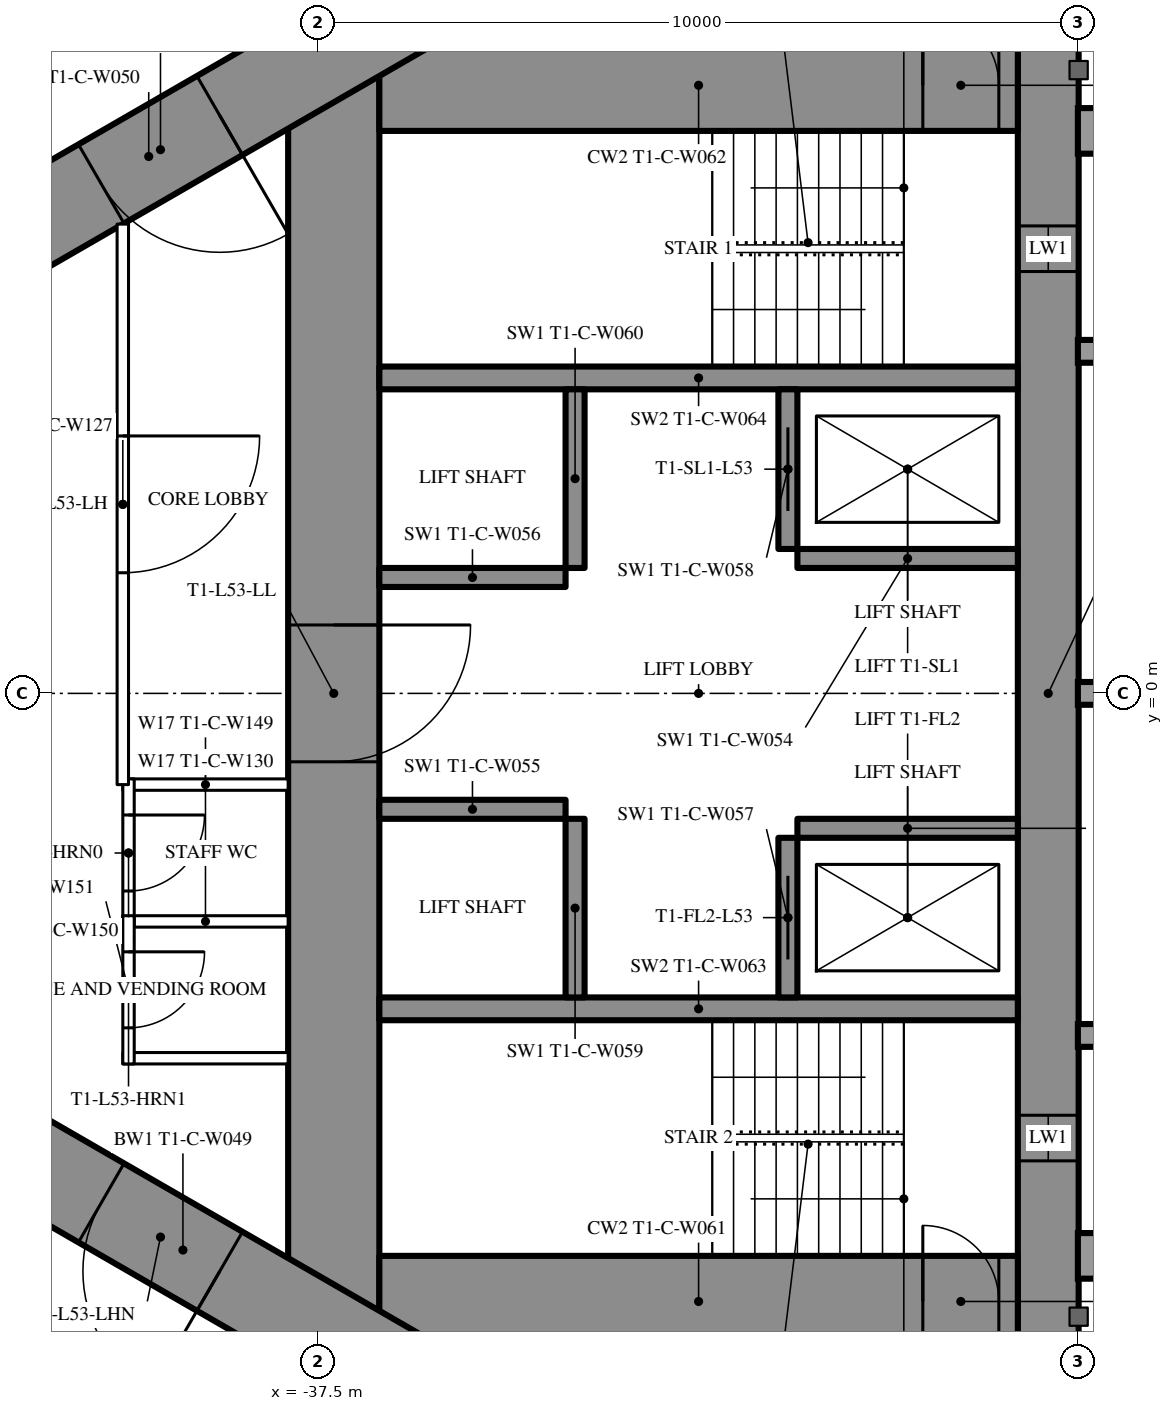
"""IFC4 building model, lengths in metres.
Left out: names, types, materials, properties, quantities, classifications, styles, units other than length and angle.
Written with IfcOpenShell. Run it as: python <this file> out.ifc"""

import sys

from ifc_helpers import new_model, si_unit, direction, frame, frame_2d, origin, place, context, subcontext, project, spatial, rectangle, extrude, element, fill, save


model = new_model("IFC4")
c1 = context("Model", 3, precision=1e-05, world=origin(), true_north=direction((0.0, 1.0)))
c2 = subcontext(c1, "Body", "Model", "MODEL_VIEW")
j1 = project(units=[si_unit("LENGTHUNIT", "METRE"), si_unit("PLANEANGLEUNIT", "RADIAN")], contexts=[c1])
p1 = place(None, origin())
s1 = spatial("IfcSite", under=j1, at=p1, CompositionType="ELEMENT")
p2 = place(p1, origin())
s2 = spatial("IfcBuilding", under=s1, at=p2, CompositionType="ELEMENT")
p3 = place(p2, frame((0.0, 0.0, 198.3)))
s3 = spatial("IfcBuildingStorey", under=s2, at=p3, CompositionType="ELEMENT", Elevation=198.3)
p4 = place(p3, frame((-27.9, 8.6, 0.0), z_axis=(0.0, 0.0, 1.0), x_axis=(0.0, -1.0, 0.0)))
e1 = element("IfcWall", 1, at=p4, inside=s3, PredefinedType="SHEAR", context=c2, shape_type="SweptSolid", body=[
    extrude(rectangle(XDim=17.2, YDim=0.8, at=frame_2d((8.6, 0.0))), origin(), (0.0, 0.0, 1.0), 3.5),
])
p5 = place(p4, frame((2.45, 0.0, 0.6)))
e2 = element("IfcOpeningElement", 2, at=p5, cuts=e1, PredefinedType="OPENING", context=c2, shape_type="SweptSolid", body=[
    extrude(rectangle(XDim=0.6, YDim=2.1, at=frame_2d((0.3, 1.05))), frame((0.0, 0.41, 0.0), z_axis=(0.0, -1.0, 0.0), x_axis=(1.0, 0.0, 0.0)), (0.0, 0.0, 1.0), 0.82),
])
p6 = place(p4, frame((14.15, 0.0, 0.6)))
e3 = element("IfcOpeningElement", 3, at=p6, cuts=e1, PredefinedType="OPENING", context=c2, shape_type="SweptSolid", body=[
    extrude(rectangle(XDim=0.6, YDim=2.1, at=frame_2d((0.3, 1.05))), frame((0.0, 0.41, 0.0), z_axis=(0.0, -1.0, 0.0), x_axis=(1.0, 0.0, 0.0)), (0.0, 0.0, 1.0), 0.82),
])
p7 = place(p3, frame((-37.3, 8.6, 0.0), z_axis=(0.0, 0.0, 1.0), x_axis=(0.0, -1.0, 0.0)))
e4 = element("IfcWall", 4, at=p7, inside=s3, PredefinedType="SHEAR", context=c2, shape_type="SweptSolid", body=[
    extrude(rectangle(XDim=17.2, YDim=1.2, at=frame_2d((8.6, 0.0))), origin(), (0.0, 0.0, 1.0), 3.5),
])
p8 = place(p7, frame((7.7, 0.0, 0.0)))
e5 = element("IfcOpeningElement", 5, at=p8, cuts=e4, PredefinedType="OPENING", context=c2, shape_type="SweptSolid", body=[
    extrude(rectangle(XDim=1.8, YDim=2.2, at=frame_2d((0.9, 1.1))), frame((0.0, 0.61, 0.0), z_axis=(0.0, -1.0, 0.0), x_axis=(1.0, 0.0, 0.0)), (0.0, 0.0, 1.0), 1.22),
])
p9 = place(p3, frame((-28.3, 8.0, 0.0), z_axis=(0.0, 0.0, 1.0), x_axis=(-1.0, 0.0, 0.0)))
e6 = element("IfcWall", 6, at=p9, inside=s3, PredefinedType="SHEAR", context=c2, shape_type="SweptSolid", body=[
    extrude(rectangle(XDim=8.4, YDim=1.2, at=frame_2d((4.2, 0.0))), origin(), (0.0, 0.0, 1.0), 3.5),
])
p10 = place(p9, frame((0.25, 0.0, 0.0)))
e7 = element("IfcOpeningElement", 7, at=p10, cuts=e6, PredefinedType="OPENING", context=c2, shape_type="SweptSolid", body=[
    extrude(rectangle(XDim=1.0, YDim=2.2, at=frame_2d((0.5, 1.1))), frame((0.0, 0.61, 0.0), z_axis=(0.0, -1.0, 0.0), x_axis=(1.0, 0.0, 0.0)), (0.0, 0.0, 1.0), 1.22),
])
p11 = place(p3, frame((-28.3, -8.0, 0.0), z_axis=(0.0, 0.0, 1.0), x_axis=(-1.0, 0.0, 0.0)))
e8 = element("IfcWall", 8, at=p11, inside=s3, PredefinedType="SHEAR", context=c2, shape_type="SweptSolid", body=[
    extrude(rectangle(XDim=8.4, YDim=1.2, at=frame_2d((4.2, 0.0))), origin(), (0.0, 0.0, 1.0), 3.5),
])
p12 = place(p11, frame((0.25, 0.0, 0.0)))
e9 = element("IfcOpeningElement", 9, at=p12, cuts=e8, PredefinedType="OPENING", context=c2, shape_type="SweptSolid", body=[
    extrude(rectangle(XDim=1.0, YDim=2.2, at=frame_2d((0.5, 1.1))), frame((0.0, 0.61, 0.0), z_axis=(0.0, -1.0, 0.0), x_axis=(1.0, 0.0, 0.0)), (0.0, 0.0, 1.0), 1.22),
])
for number, where, z_axis, x_axis in (
    (10, (-28.3, 4.15, 0.0), (0.0, 0.0, 1.0), (-1.0, 0.0, 0.0)),
    (11, (-28.3, -4.15, 0.0), (0.0, 0.0, 1.0), (-1.0, 0.0, 0.0)),
):
    element("IfcWall", number, at=place(p3, frame(where, z_axis=z_axis, x_axis=x_axis)), inside=s3, PredefinedType="SHEAR", context=c2, shape_type="SweptSolid", body=[
        extrude(rectangle(XDim=8.4, YDim=0.3, at=frame_2d((4.2, 0.0))), origin(), (0.0, 0.0, 1.0), 3.5),
    ])
p13 = place(p3, frame((-31.325, 4.0, 0.0), z_axis=(0.0, 0.0, 1.0), x_axis=(0.0, -1.0, 0.0)))
e12 = element("IfcWall", 12, at=p13, inside=s3, PredefinedType="SHEAR", context=c2, shape_type="SweptSolid", body=[
    extrude(rectangle(XDim=2.1, YDim=0.25, at=frame_2d((1.05, 0.0))), origin(), (0.0, 0.0, 1.0), 3.5),
])
p14 = place(p13, frame((0.5, 0.0, 0.0)))
e13 = element("IfcOpeningElement", 13, at=p14, cuts=e12, PredefinedType="OPENING", context=c2, shape_type="SweptSolid", body=[
    extrude(rectangle(XDim=1.1, YDim=2.2, at=frame_2d((0.55, 1.1))), frame((0.0, 0.135, 0.0), z_axis=(0.0, -1.0, 0.0), x_axis=(1.0, 0.0, 0.0)), (0.0, 0.0, 1.0), 0.27),
])
p15 = place(p3, frame((-34.125, 4.0, 0.0), z_axis=(0.0, 0.0, 1.0), x_axis=(0.0, -1.0, 0.0)))
e14 = element("IfcWall", 14, at=p15, inside=s3, PredefinedType="SHEAR", context=c2, shape_type="SweptSolid", body=[
    extrude(rectangle(XDim=2.35, YDim=0.25, at=frame_2d((1.175, 0.0))), origin(), (0.0, 0.0, 1.0), 3.5),
])
p16 = place(p3, frame((-28.3, 1.775, 0.0), z_axis=(0.0, 0.0, 1.0), x_axis=(-1.0, 0.0, 0.0)))
e15 = element("IfcWall", 15, at=p16, inside=s3, PredefinedType="SHEAR", context=c2, shape_type="SweptSolid", body=[
    extrude(rectangle(XDim=2.9, YDim=0.25, at=frame_2d((1.45, 0.0))), origin(), (0.0, 0.0, 1.0), 3.5),
])
p17 = place(p3, frame((-34.25, 1.525, 0.0), z_axis=(0.0, 0.0, 1.0), x_axis=(-1.0, 0.0, 0.0)))
e16 = element("IfcWall", 16, at=p17, inside=s3, PredefinedType="SHEAR", context=c2, shape_type="SweptSolid", body=[
    extrude(rectangle(XDim=2.45, YDim=0.25, at=frame_2d((1.225, 0.0))), origin(), (0.0, 0.0, 1.0), 3.5),
])
p18 = place(p3, frame((-31.325, -1.9, 0.0), z_axis=(0.0, 0.0, 1.0), x_axis=(0.0, -1.0, 0.0)))
e17 = element("IfcWall", 17, at=p18, inside=s3, PredefinedType="SHEAR", context=c2, shape_type="SweptSolid", body=[
    extrude(rectangle(XDim=2.1, YDim=0.25, at=frame_2d((1.05, 0.0))), origin(), (0.0, 0.0, 1.0), 3.5),
])
p19 = place(p18, frame((0.5, 0.0, 0.0)))
e18 = element("IfcOpeningElement", 18, at=p19, cuts=e17, PredefinedType="OPENING", context=c2, shape_type="SweptSolid", body=[
    extrude(rectangle(XDim=1.1, YDim=2.2, at=frame_2d((0.55, 1.1))), frame((0.0, 0.135, 0.0), z_axis=(0.0, -1.0, 0.0), x_axis=(1.0, 0.0, 0.0)), (0.0, 0.0, 1.0), 0.27),
])
p20 = place(p3, frame((-34.125, -1.65, 0.0), z_axis=(0.0, 0.0, 1.0), x_axis=(0.0, -1.0, 0.0)))
e19 = element("IfcWall", 19, at=p20, inside=s3, PredefinedType="SHEAR", context=c2, shape_type="SweptSolid", body=[
    extrude(rectangle(XDim=2.35, YDim=0.25, at=frame_2d((1.175, 0.0))), origin(), (0.0, 0.0, 1.0), 3.5),
])
p21 = place(p3, frame((-28.3, -1.775, 0.0), z_axis=(0.0, 0.0, 1.0), x_axis=(-1.0, 0.0, 0.0)))
e20 = element("IfcWall", 20, at=p21, inside=s3, PredefinedType="SHEAR", context=c2, shape_type="SweptSolid", body=[
    extrude(rectangle(XDim=2.9, YDim=0.25, at=frame_2d((1.45, 0.0))), origin(), (0.0, 0.0, 1.0), 3.5),
])
p22 = place(p3, frame((-34.25, -1.525, 0.0), z_axis=(0.0, 0.0, 1.0), x_axis=(-1.0, 0.0, 0.0)))
e21 = element("IfcWall", 21, at=p22, inside=s3, PredefinedType="SHEAR", context=c2, shape_type="SweptSolid", body=[
    extrude(rectangle(XDim=2.45, YDim=0.25, at=frame_2d((1.225, 0.0))), origin(), (0.0, 0.0, 1.0), 3.5),
])
p23 = place(p3, frame((-27.2, 14.3, 0.0), z_axis=(0.0, 0.0, 1.0), x_axis=(-0.866026593062, -0.499997940104, 0.0)))
e22 = element("IfcWall", 22, at=p23, inside=s3, PredefinedType="SHEAR", context=c2, shape_type="SweptSolid", body=[
    extrude(rectangle(XDim=28.946, YDim=1.2, at=frame_2d((14.473, 0.0))), origin(), (0.0, 0.0, 1.0), 3.5),
])
p24 = place(p23, frame((4.6, 0.0, 0.0)))
e23 = element("IfcOpeningElement", 23, at=p24, cuts=e22, PredefinedType="OPENING", context=c2, shape_type="SweptSolid", body=[
    extrude(rectangle(XDim=1.0, YDim=2.2, at=frame_2d((0.5, 1.1))), frame((0.0, 0.61, 0.0), z_axis=(0.0, -1.0, 0.0), x_axis=(1.0, 0.0, 0.0)), (0.0, 0.0, 1.0), 1.22),
])
p25 = place(p23, frame((13.395, 0.0, 0.0)))
e24 = element("IfcOpeningElement", 24, at=p25, cuts=e22, PredefinedType="OPENING", context=c2, shape_type="SweptSolid", body=[
    extrude(rectangle(XDim=1.8, YDim=2.2, at=frame_2d((0.9, 1.1))), frame((0.0, 0.61, 0.0), z_axis=(0.0, -1.0, 0.0), x_axis=(1.0, 0.0, 0.0)), (0.0, 0.0, 1.0), 1.22),
])
p26 = place(p3, frame((-27.2, -14.3, 0.0), z_axis=(0.0, 0.0, 1.0), x_axis=(-0.866024021859, 0.500002393557, 0.0)))
e25 = element("IfcWall", 25, at=p26, inside=s3, PredefinedType="SHEAR", context=c2, shape_type="SweptSolid", body=[
    extrude(rectangle(XDim=27.907, YDim=1.2, at=frame_2d((13.954, 0.0))), origin(), (0.0, 0.0, 1.0), 3.5),
])
p27 = place(p26, frame((4.6, 0.0, 0.0)))
e26 = element("IfcOpeningElement", 26, at=p27, cuts=e25, PredefinedType="OPENING", context=c2, shape_type="SweptSolid", body=[
    extrude(rectangle(XDim=1.0, YDim=2.2, at=frame_2d((0.5, 1.1))), frame((0.0, 0.61, 0.0), z_axis=(0.0, -1.0, 0.0), x_axis=(1.0, 0.0, 0.0)), (0.0, 0.0, 1.0), 1.22),
])
p28 = place(p26, frame((13.395, 0.0, 0.0)))
e27 = element("IfcOpeningElement", 27, at=p28, cuts=e25, PredefinedType="OPENING", context=c2, shape_type="SweptSolid", body=[
    extrude(rectangle(XDim=1.8, YDim=2.2, at=frame_2d((0.9, 1.1))), frame((0.0, 0.61, 0.0), z_axis=(0.0, -1.0, 0.0), x_axis=(1.0, 0.0, 0.0)), (0.0, 0.0, 1.0), 1.22),
])
p29 = place(p3, frame((-27.86, 16.575, 0.0), z_axis=(0.0, 0.0, 1.0), x_axis=(-0.866025533911, -0.499999774615, 0.0)))
e28 = element("IfcWall", 28, at=p29, inside=s3, PredefinedType="PARTITIONING", context=c2, shape_type="SweptSolid", body=[
    extrude(rectangle(XDim=33.149, YDim=0.2, at=frame_2d((16.575, 0.0))), origin(), (0.0, 0.0, 1.0), 3.25),
])
p30 = place(p29, frame((3.75, 0.0, 0.0)))
e29 = element("IfcOpeningElement", 29, at=p30, cuts=e28, PredefinedType="OPENING", context=c2, shape_type="SweptSolid", body=[
    extrude(rectangle(XDim=1.0, YDim=2.2, at=frame_2d((0.5, 1.1))), frame((0.0, 0.11, 0.0), z_axis=(0.0, -1.0, 0.0), x_axis=(1.0, 0.0, 0.0)), (0.0, 0.0, 1.0), 0.22),
])
p31 = place(p29, frame((16.402, 0.0, 0.0)))
e30 = element("IfcOpeningElement", 30, at=p31, cuts=e28, PredefinedType="OPENING", context=c2, shape_type="SweptSolid", body=[
    extrude(rectangle(XDim=0.95, YDim=2.2, at=frame_2d((0.475, 1.1))), frame((0.0, 0.11, 0.0), z_axis=(0.0, -1.0, 0.0), x_axis=(1.0, 0.0, 0.0)), (0.0, 0.0, 1.0), 0.22),
])
p32 = place(p29, frame((22.047, 0.0, 0.0)))
e31 = element("IfcOpeningElement", 31, at=p32, cuts=e28, PredefinedType="OPENING", context=c2, shape_type="SweptSolid", body=[
    extrude(rectangle(XDim=0.95, YDim=2.2, at=frame_2d((0.475, 1.1))), frame((0.0, 0.11, 0.0), z_axis=(0.0, -1.0, 0.0), x_axis=(1.0, 0.0, 0.0)), (0.0, 0.0, 1.0), 0.22),
])
p33 = place(p29, frame((30.396, 0.0, 0.0)))
e32 = element("IfcOpeningElement", 32, at=p33, cuts=e28, PredefinedType="OPENING", context=c2, shape_type="SweptSolid", body=[
    extrude(rectangle(XDim=1.8, YDim=2.2, at=frame_2d((0.9, 1.1))), frame((0.0, 0.11, 0.0), z_axis=(0.0, -1.0, 0.0), x_axis=(1.0, 0.0, 0.0)), (0.0, 0.0, 1.0), 0.22),
])
for number, where, z_axis, x_axis in (
    (33, (-37.9, -1.2, 0.0), (0.0, 0.0, 1.0), (-1.0, 0.0, 0.0)),
    (34, (-37.9, -3.0, 0.0), (0.0, 0.0, 1.0), (-1.0, 0.0, 0.0)),
    (35, (-37.9, -4.8, 0.0), (0.0, 0.0, 1.0), (-1.0, 0.0, 0.0)),
):
    element("IfcWall", number, at=place(p3, frame(where, z_axis=z_axis, x_axis=x_axis)), inside=s3, PredefinedType="PARTITIONING", context=c2, shape_type="SweptSolid", body=[
        extrude(rectangle(XDim=2.175, YDim=0.15, at=frame_2d((1.087, 0.0))), origin(), (0.0, 0.0, 1.0), 3.25),
    ])
p34 = place(p3, frame((-40.0, -1.125, 0.0), z_axis=(0.0, 0.0, 1.0), x_axis=(0.0, -1.0, 0.0)))
e36 = element("IfcWall", 36, at=p34, inside=s3, PredefinedType="PARTITIONING", context=c2, shape_type="SweptSolid", body=[
    extrude(rectangle(XDim=1.95, YDim=0.15, at=frame_2d((0.975, 0.0))), origin(), (0.0, 0.0, 1.0), 3.25),
])
p35 = place(p34, frame((0.475, 0.0, 0.0)))
e37 = element("IfcOpeningElement", 37, at=p35, cuts=e36, PredefinedType="OPENING", context=c2, shape_type="SweptSolid", body=[
    extrude(rectangle(XDim=1.0, YDim=2.2, at=frame_2d((0.5, 1.1))), frame((0.0, 0.085, 0.0), z_axis=(0.0, -1.0, 0.0), x_axis=(1.0, 0.0, 0.0)), (0.0, 0.0, 1.0), 0.17),
])
p36 = place(p3, frame((-40.0, -2.925, 0.0), z_axis=(0.0, 0.0, 1.0), x_axis=(0.0, -1.0, 0.0)))
e38 = element("IfcWall", 38, at=p36, inside=s3, PredefinedType="PARTITIONING", context=c2, shape_type="SweptSolid", body=[
    extrude(rectangle(XDim=1.95, YDim=0.15, at=frame_2d((0.975, 0.0))), origin(), (0.0, 0.0, 1.0), 3.25),
])
p37 = place(p36, frame((0.475, 0.0, 0.0)))
e39 = element("IfcOpeningElement", 39, at=p37, cuts=e38, PredefinedType="OPENING", context=c2, shape_type="SweptSolid", body=[
    extrude(rectangle(XDim=1.0, YDim=2.2, at=frame_2d((0.5, 1.1))), frame((0.0, 0.085, 0.0), z_axis=(0.0, -1.0, 0.0), x_axis=(1.0, 0.0, 0.0)), (0.0, 0.0, 1.0), 0.17),
])
p38 = place(p3, frame((-40.075, 6.174, 0.0), z_axis=(0.0, 0.0, 1.0), x_axis=(0.0, -1.0, 0.0)))
e40 = element("IfcWall", 40, at=p38, inside=s3, PredefinedType="PARTITIONING", context=c2, shape_type="SweptSolid", body=[
    extrude(rectangle(XDim=7.374, YDim=0.15, at=frame_2d((3.687, 0.0))), origin(), (0.0, 0.0, 1.0), 3.25),
])
p39 = place(p38, frame((2.787, 0.0, 0.0)))
e41 = element("IfcOpeningElement", 41, at=p39, cuts=e40, PredefinedType="OPENING", context=c2, shape_type="SweptSolid", body=[
    extrude(rectangle(XDim=1.8, YDim=2.2, at=frame_2d((0.9, 1.1))), frame((0.0, 0.085, 0.0), z_axis=(0.0, -1.0, 0.0), x_axis=(1.0, 0.0, 0.0)), (0.0, 0.0, 1.0), 0.17),
])
p40 = place(p3, frame((-39.758, -11.697, 0.0), z_axis=(0.0, 0.0, 1.0), x_axis=(-0.866024194504, 0.500002094529, 0.0)))
e42 = element("IfcWall", 42, at=p40, inside=s3, PredefinedType="PARTITIONING", context=c2, shape_type="SweptSolid", body=[
    extrude(rectangle(XDim=6.6, YDim=0.25, at=frame_2d((3.3, 0.0))), origin(), (0.0, 0.0, 1.0), 3.25),
])
p41 = place(p40, frame((0.75, 0.0, 0.0)))
e43 = element("IfcOpeningElement", 43, at=p41, cuts=e42, PredefinedType="OPENING", context=c2, shape_type="SweptSolid", body=[
    extrude(rectangle(XDim=1.1, YDim=2.2, at=frame_2d((0.55, 1.1))), frame((0.0, 0.135, 0.0), z_axis=(0.0, -1.0, 0.0), x_axis=(1.0, 0.0, 0.0)), (0.0, 0.0, 1.0), 0.27),
])
p42 = place(p40, frame((2.75, 0.0, 0.0)))
e44 = element("IfcOpeningElement", 44, at=p42, cuts=e42, PredefinedType="OPENING", context=c2, shape_type="SweptSolid", body=[
    extrude(rectangle(XDim=1.1, YDim=2.2, at=frame_2d((0.55, 1.1))), frame((0.0, 0.135, 0.0), z_axis=(0.0, -1.0, 0.0), x_axis=(1.0, 0.0, 0.0)), (0.0, 0.0, 1.0), 0.27),
])
p43 = place(p40, frame((4.75, 0.0, 0.0)))
e45 = element("IfcOpeningElement", 45, at=p43, cuts=e42, PredefinedType="OPENING", context=c2, shape_type="SweptSolid", body=[
    extrude(rectangle(XDim=1.1, YDim=2.2, at=frame_2d((0.55, 1.1))), frame((0.0, 0.135, 0.0), z_axis=(0.0, -1.0, 0.0), x_axis=(1.0, 0.0, 0.0)), (0.0, 0.0, 1.0), 0.27),
])
p44 = place(p35, origin())
e46 = element("IfcDoor", 46, at=p44, inside=s3, OperationType="SINGLE_SWING_LEFT", PredefinedType="DOOR", context=c2, shape_type="SweptSolid", body=[
    extrude(rectangle(XDim=1.0, YDim=2.2, at=frame_2d((0.5, 1.1))), frame((0.0, 0.025, 0.0), z_axis=(0.0, -1.0, 0.0), x_axis=(1.0, 0.0, 0.0)), (0.0, 0.0, 1.0), 0.05),
])
fill(e37, e46)
p45 = place(p37, origin())
e47 = element("IfcDoor", 47, at=p45, inside=s3, OperationType="SINGLE_SWING_LEFT", PredefinedType="DOOR", context=c2, shape_type="SweptSolid", body=[
    extrude(rectangle(XDim=1.0, YDim=2.2, at=frame_2d((0.5, 1.1))), frame((0.0, 0.025, 0.0), z_axis=(0.0, -1.0, 0.0), x_axis=(1.0, 0.0, 0.0)), (0.0, 0.0, 1.0), 0.05),
])
fill(e39, e47)
p46 = place(p39, origin())
e48 = element("IfcDoor", 48, at=p46, inside=s3, OperationType="DOUBLE_DOOR_SINGLE_SWING", PredefinedType="DOOR", context=c2, shape_type="SweptSolid", body=[
    extrude(rectangle(XDim=1.8, YDim=2.2, at=frame_2d((0.9, 1.1))), frame((0.0, 0.025, 0.0), z_axis=(0.0, -1.0, 0.0), x_axis=(1.0, 0.0, 0.0)), (0.0, 0.0, 1.0), 0.05),
])
fill(e41, e48)
p47 = place(p25, origin())
e49 = element("IfcDoor", 49, at=p47, inside=s3, OperationType="DOUBLE_DOOR_SINGLE_SWING", PredefinedType="DOOR", context=c2, shape_type="SweptSolid", body=[
    extrude(rectangle(XDim=1.8, YDim=2.2, at=frame_2d((0.9, 1.1))), frame((0.0, 0.025, 0.0), z_axis=(0.0, -1.0, 0.0), x_axis=(1.0, 0.0, 0.0)), (0.0, 0.0, 1.0), 0.05),
])
fill(e24, e49)
p48 = place(p28, origin())
e50 = element("IfcDoor", 50, at=p48, inside=s3, OperationType="DOUBLE_DOOR_SINGLE_SWING", PredefinedType="DOOR", context=c2, shape_type="SweptSolid", body=[
    extrude(rectangle(XDim=1.8, YDim=2.2, at=frame_2d((0.9, 1.1))), frame((0.0, 0.025, 0.0), z_axis=(0.0, -1.0, 0.0), x_axis=(1.0, 0.0, 0.0)), (0.0, 0.0, 1.0), 0.05),
])
fill(e27, e50)
p49 = place(p8, origin())
e51 = element("IfcDoor", 51, at=p49, inside=s3, OperationType="DOUBLE_DOOR_SINGLE_SWING", PredefinedType="DOOR", context=c2, shape_type="SweptSolid", body=[
    extrude(rectangle(XDim=1.8, YDim=2.2, at=frame_2d((0.9, 1.1))), frame((0.0, 0.025, 0.0), z_axis=(0.0, -1.0, 0.0), x_axis=(1.0, 0.0, 0.0)), (0.0, 0.0, 1.0), 0.05),
])
fill(e5, e51)
p50 = place(p10, origin())
e52 = element("IfcDoor", 52, at=p50, inside=s3, OperationType="SINGLE_SWING_RIGHT", PredefinedType="DOOR", context=c2, shape_type="SweptSolid", body=[
    extrude(rectangle(XDim=1.0, YDim=2.2, at=frame_2d((0.5, 1.1))), frame((0.0, 0.025, 0.0), z_axis=(0.0, -1.0, 0.0), x_axis=(1.0, 0.0, 0.0)), (0.0, 0.0, 1.0), 0.05),
])
fill(e7, e52)
p51 = place(p12, origin())
e53 = element("IfcDoor", 53, at=p51, inside=s3, OperationType="SINGLE_SWING_RIGHT", PredefinedType="DOOR", context=c2, shape_type="SweptSolid", body=[
    extrude(rectangle(XDim=1.0, YDim=2.2, at=frame_2d((0.5, 1.1))), frame((0.0, 0.025, 0.0), z_axis=(0.0, -1.0, 0.0), x_axis=(1.0, 0.0, 0.0)), (0.0, 0.0, 1.0), 0.05),
])
fill(e9, e53)
p52 = place(p14, origin())
e54 = element("IfcDoor", 54, at=p52, inside=s3, OperationType="SLIDING_TO_LEFT", PredefinedType="USERDEFINED", context=c2, shape_type="SweptSolid", body=[
    extrude(rectangle(XDim=1.1, YDim=2.2, at=frame_2d((0.55, 1.1))), frame((0.0, 0.025, 0.0), z_axis=(0.0, -1.0, 0.0), x_axis=(1.0, 0.0, 0.0)), (0.0, 0.0, 1.0), 0.05),
])
fill(e13, e54)
p53 = place(p19, origin())
e55 = element("IfcDoor", 55, at=p53, inside=s3, OperationType="SLIDING_TO_LEFT", PredefinedType="USERDEFINED", context=c2, shape_type="SweptSolid", body=[
    extrude(rectangle(XDim=1.1, YDim=2.2, at=frame_2d((0.55, 1.1))), frame((0.0, 0.025, 0.0), z_axis=(0.0, -1.0, 0.0), x_axis=(1.0, 0.0, 0.0)), (0.0, 0.0, 1.0), 0.05),
])
fill(e18, e55)
p54 = place(p5, origin())
e56 = element("IfcWindow", 56, at=p54, inside=s3, PartitioningType="SINGLE_PANEL", PredefinedType="WINDOW", context=c2, shape_type="SweptSolid", body=[
    extrude(rectangle(XDim=0.6, YDim=2.1, at=frame_2d((0.3, 1.05))), frame((0.0, 0.03, 0.0), z_axis=(0.0, -1.0, 0.0), x_axis=(1.0, 0.0, 0.0)), (0.0, 0.0, 1.0), 0.06),
])
fill(e2, e56)
p55 = place(p6, origin())
e57 = element("IfcWindow", 57, at=p55, inside=s3, PartitioningType="SINGLE_PANEL", PredefinedType="WINDOW", context=c2, shape_type="SweptSolid", body=[
    extrude(rectangle(XDim=0.6, YDim=2.1, at=frame_2d((0.3, 1.05))), frame((0.0, 0.03, 0.0), z_axis=(0.0, -1.0, 0.0), x_axis=(1.0, 0.0, 0.0)), (0.0, 0.0, 1.0), 0.06),
])
fill(e3, e57)
save(model, sys.argv[1])
